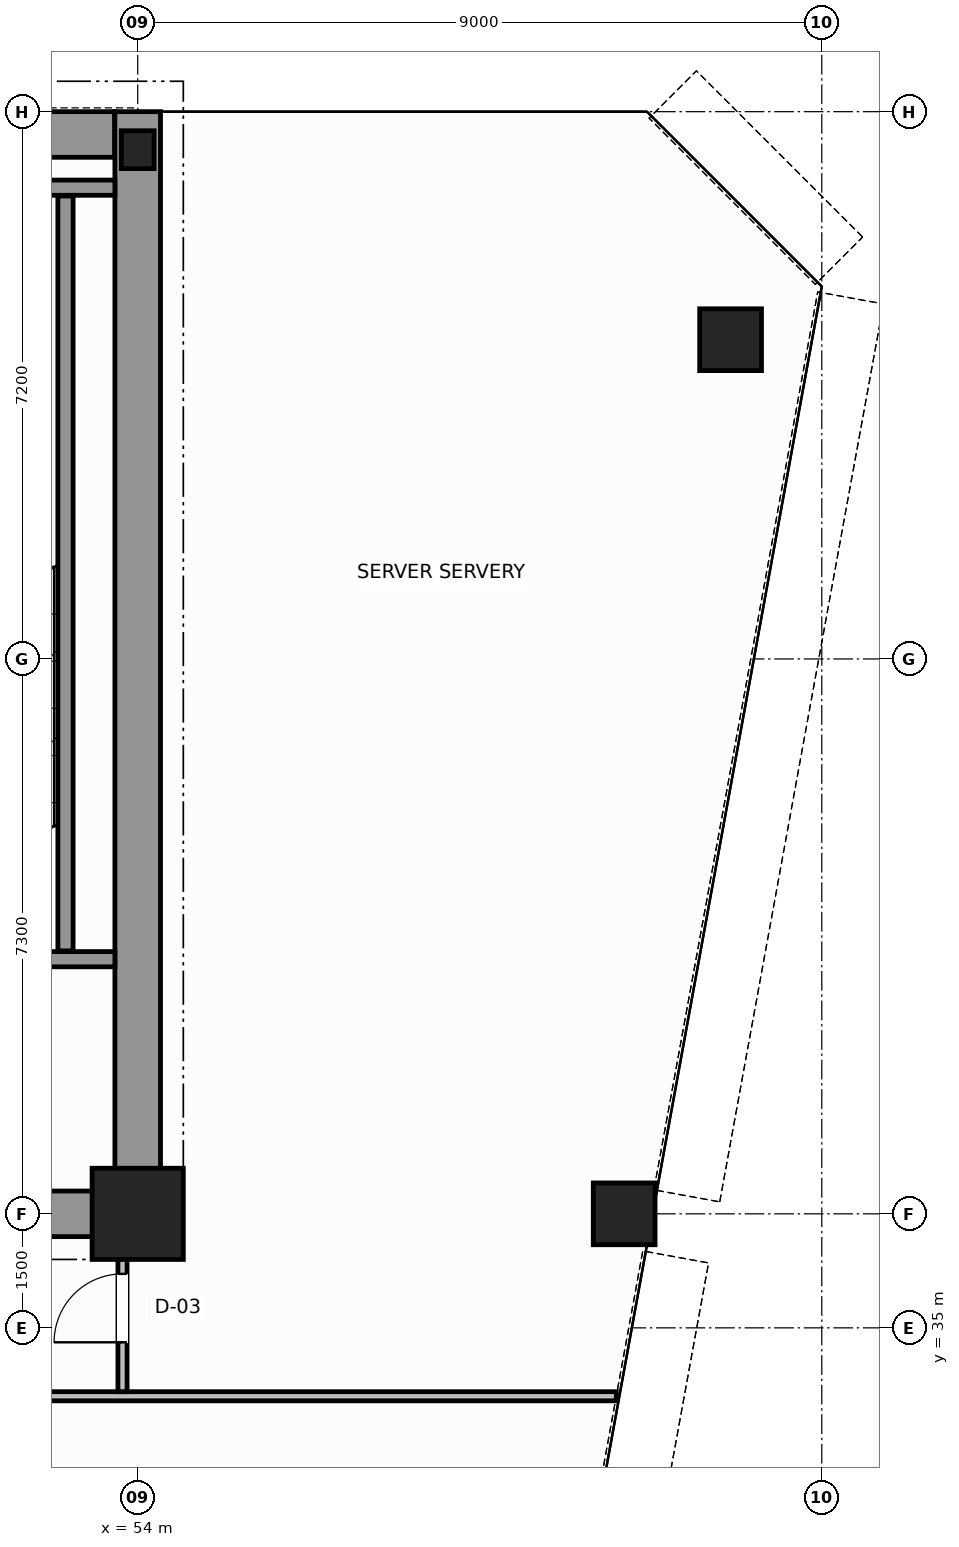
"""IFC4 building model, lengths in metres.
Left out: names, types, materials, properties, quantities, classifications, styles, units other than length and angle.
Written with IfcOpenShell. Run it as: python <this file> out.ifc"""

import sys

from ifc_helpers import new_model, si_unit, direction, frame, frame_2d, origin, origin_2d, place, context, subcontext, project, spatial, rectangle, hollow_circle, i_section, extrude, source, transform, mapped, element, fill, save


model = new_model("IFC4")
c1 = context("Model", 3, precision=1e-05, world=origin(), true_north=direction((0.0, 1.0)))
c2 = subcontext(c1, "Body", "Model", "MODEL_VIEW")
j1 = project(units=[si_unit("LENGTHUNIT", "METRE"), si_unit("PLANEANGLEUNIT", "RADIAN")], contexts=[c1])
p1 = place(None, origin())
s1 = spatial("IfcSite", under=j1, at=p1, CompositionType="ELEMENT")
p2 = place(p1, origin())
s2 = spatial("IfcBuilding", under=s1, at=p2, CompositionType="ELEMENT")
p3 = place(p2, frame((0.0, 0.0, 169.0)))
s3 = spatial("IfcBuildingStorey", under=s2, at=p3, CompositionType="ELEMENT", Elevation=169.0)
m1 = source(origin(), c2, "Body", "SweptSolid", [
    extrude(rectangle(XDim=1.2, YDim=1.2, at=origin_2d()), origin(), (0.0, 0.0, 1.0), 3.8),
])
p4 = place(p3, frame((54.0, 36.5, 0.0), z_axis=(0.0, 0.0, 1.0), x_axis=(1.0, 0.0, 0.0)))
e1 = element("IfcColumn", 1, at=p4, inside=s3, PredefinedType="COLUMN", context=c2, shape_type="MappedRepresentation", body=[
    mapped(m1, transform((0.0, 0.0, 0.0), scale=1.0)),
])
m2 = source(origin(), c2, "Body", "SweptSolid", [
    extrude(i_section(OverallWidth=0.432, OverallDepth=0.498, WebThickness=0.055, FlangeThickness=0.068, FilletRadius=0.015, at=origin_2d()), origin(), (0.0, 0.0, 1.0), 3.8),
])
p5 = place(p3, frame((54.0, 50.5, 0.0), z_axis=(0.0, 0.0, 1.0), x_axis=(1.0, 0.0, 0.0)))
e2 = element("IfcColumn", 2, at=p5, inside=s3, PredefinedType="COLUMN", context=c2, shape_type="MappedRepresentation", body=[
    mapped(m2, transform((0.0, 0.0, 0.0), scale=1.0)),
])
m3 = source(origin(), c2, "Body", "SweptSolid", [
    extrude(hollow_circle(Radius=0.406, WallThickness=0.04, at=origin_2d()), origin(), (0.0, 0.0, 1.0), 3.8),
])
for number, where, z_axis, x_axis in (
    (3, (61.8, 48.0, 0.0), (0.0, 0.0, 1.0), (1.0, 0.0, 0.0)),
    (4, (60.4, 36.5, 0.0), (0.0, 0.0, 1.0), (1.0, 0.0, 0.0)),
):
    element("IfcColumn", number, at=place(p3, frame(where, z_axis=z_axis, x_axis=x_axis)), inside=s3, PredefinedType="COLUMN", context=c2, shape_type="MappedRepresentation", body=[
        mapped(m3, transform((0.0, 0.0, 0.0), scale=1.0)),
    ])
p6 = place(p3, frame((34.002, 50.7, 0.0), z_axis=(0.0, 0.0, 1.0), x_axis=(1.0, 0.0, 0.0)))
e5 = element("IfcWall", 5, at=p6, inside=s3, PredefinedType="SHEAR", context=c2, shape_type="SweptSolid", body=[
    extrude(rectangle(XDim=19.694, YDim=0.6, at=frame_2d((9.847, 0.0))), origin(), (0.0, 0.0, 1.0), 3.8),
])
p7 = place(p3, frame((54.0, 36.5, 0.0), z_axis=(0.0, 0.0, 1.0), x_axis=(0.0, 1.0, 0.0)))
e6 = element("IfcWall", 6, at=p7, inside=s3, PredefinedType="SHEAR", context=c2, shape_type="SweptSolid", body=[
    extrude(rectangle(XDim=14.5, YDim=0.6, at=frame_2d((7.25, 0.0))), origin(), (0.0, 0.0, 1.0), 3.8),
])
p8 = place(p3, frame((49.8, 36.5, 0.0), z_axis=(0.0, 0.0, 1.0), x_axis=(1.0, 0.0, 0.0)))
e7 = element("IfcWall", 7, at=p8, inside=s3, PredefinedType="SHEAR", context=c2, shape_type="SweptSolid", body=[
    extrude(rectangle(XDim=3.88, YDim=0.6, at=frame_2d((1.94, 0.0))), origin(), (0.0, 0.0, 1.0), 2.58),
])
p9 = place(p3, frame((49.4, 39.85, 0.0), z_axis=(0.0, 0.0, 1.0), x_axis=(1.0, 0.0, 0.0)))
e8 = element("IfcWall", 8, at=p9, inside=s3, PredefinedType="SOLIDWALL", context=c2, shape_type="SweptSolid", body=[
    extrude(rectangle(XDim=4.3, YDim=0.2, at=frame_2d((2.15, 0.0))), origin(), (0.0, 0.0, 1.0), 3.8),
])
p10 = place(p9, frame((1.325, 0.0, 0.0)))
e9 = element("IfcOpeningElement", 9, at=p10, cuts=e8, PredefinedType="OPENING", context=c2, shape_type="SweptSolid", body=[
    extrude(rectangle(XDim=1.1, YDim=2.15, at=frame_2d((0.55, 1.075))), frame((0.0, 0.11, 0.0), z_axis=(0.0, -1.0, 0.0), x_axis=(1.0, 0.0, 0.0)), (0.0, 0.0, 1.0), 0.22),
])
p11 = place(p3, frame((49.4, 50.0, 0.0), z_axis=(0.0, 0.0, 1.0), x_axis=(1.0, 0.0, 0.0)))
e10 = element("IfcWall", 10, at=p11, inside=s3, PredefinedType="SOLIDWALL", context=c2, shape_type="SweptSolid", body=[
    extrude(rectangle(XDim=4.3, YDim=0.2, at=frame_2d((2.15, 0.0))), origin(), (0.0, 0.0, 1.0), 3.8),
])
p12 = place(p3, frame((53.05, 39.96, 0.0), z_axis=(0.0, 0.0, 1.0), x_axis=(0.0, 1.0, 0.0)))
e11 = element("IfcWall", 11, at=p12, inside=s3, PredefinedType="SOLIDWALL", context=c2, shape_type="SweptSolid", body=[
    extrude(rectangle(XDim=9.93, YDim=0.2, at=frame_2d((4.965, 0.0))), origin(), (0.0, 0.0, 1.0), 3.8),
])
p13 = place(p3, frame((49.46, 34.1, 0.0), z_axis=(0.0, 0.0, 1.0), x_axis=(1.0, 0.0, 0.0)))
e12 = element("IfcWall", 12, at=p13, inside=s3, PredefinedType="PARTITIONING", context=c2, shape_type="SweptSolid", body=[
    extrude(rectangle(XDim=10.837, YDim=0.12, at=frame_2d((5.418, 0.0))), origin(), (0.0, 0.0, 1.0), 3.58),
])
p14 = place(p3, frame((53.8, 34.16, 0.0), z_axis=(0.0, 0.0, 1.0), x_axis=(0.0, 1.0, 0.0)))
e13 = element("IfcWall", 13, at=p14, inside=s3, PredefinedType="PARTITIONING", context=c2, shape_type="SweptSolid", body=[
    extrude(rectangle(XDim=2.28, YDim=0.12, at=frame_2d((1.14, 0.0))), origin(), (0.0, 0.0, 1.0), 3.58),
])
p15 = place(p14, frame((0.65, 0.0, 0.0)))
e14 = element("IfcOpeningElement", 14, at=p15, cuts=e13, PredefinedType="OPENING", context=c2, shape_type="SweptSolid", body=[
    extrude(rectangle(XDim=0.9, YDim=2.15, at=frame_2d((0.45, 1.075))), frame((0.0, 0.07, 0.0), z_axis=(0.0, -1.0, 0.0), x_axis=(1.0, 0.0, 0.0)), (0.0, 0.0, 1.0), 0.14),
])
m4 = source(origin(), c2, "Body", "SweptSolid", [
    extrude(rectangle(XDim=0.9, YDim=2.15, at=frame_2d((0.45, 1.075))), frame((0.0, 0.025, 0.0), z_axis=(0.0, -1.0, 0.0), x_axis=(1.0, 0.0, 0.0)), (0.0, 0.0, 1.0), 0.05),
])
p16 = place(p15, origin())
e15 = element("IfcDoor", 15, at=p16, inside=s3, OperationType="SINGLE_SWING_RIGHT", PredefinedType="DOOR", context=c2, shape_type="MappedRepresentation", body=[
    mapped(m4, transform((0.0, 0.0, 0.0), scale=1.0)),
])
fill(e14, e15)
save(model, sys.argv[1])
